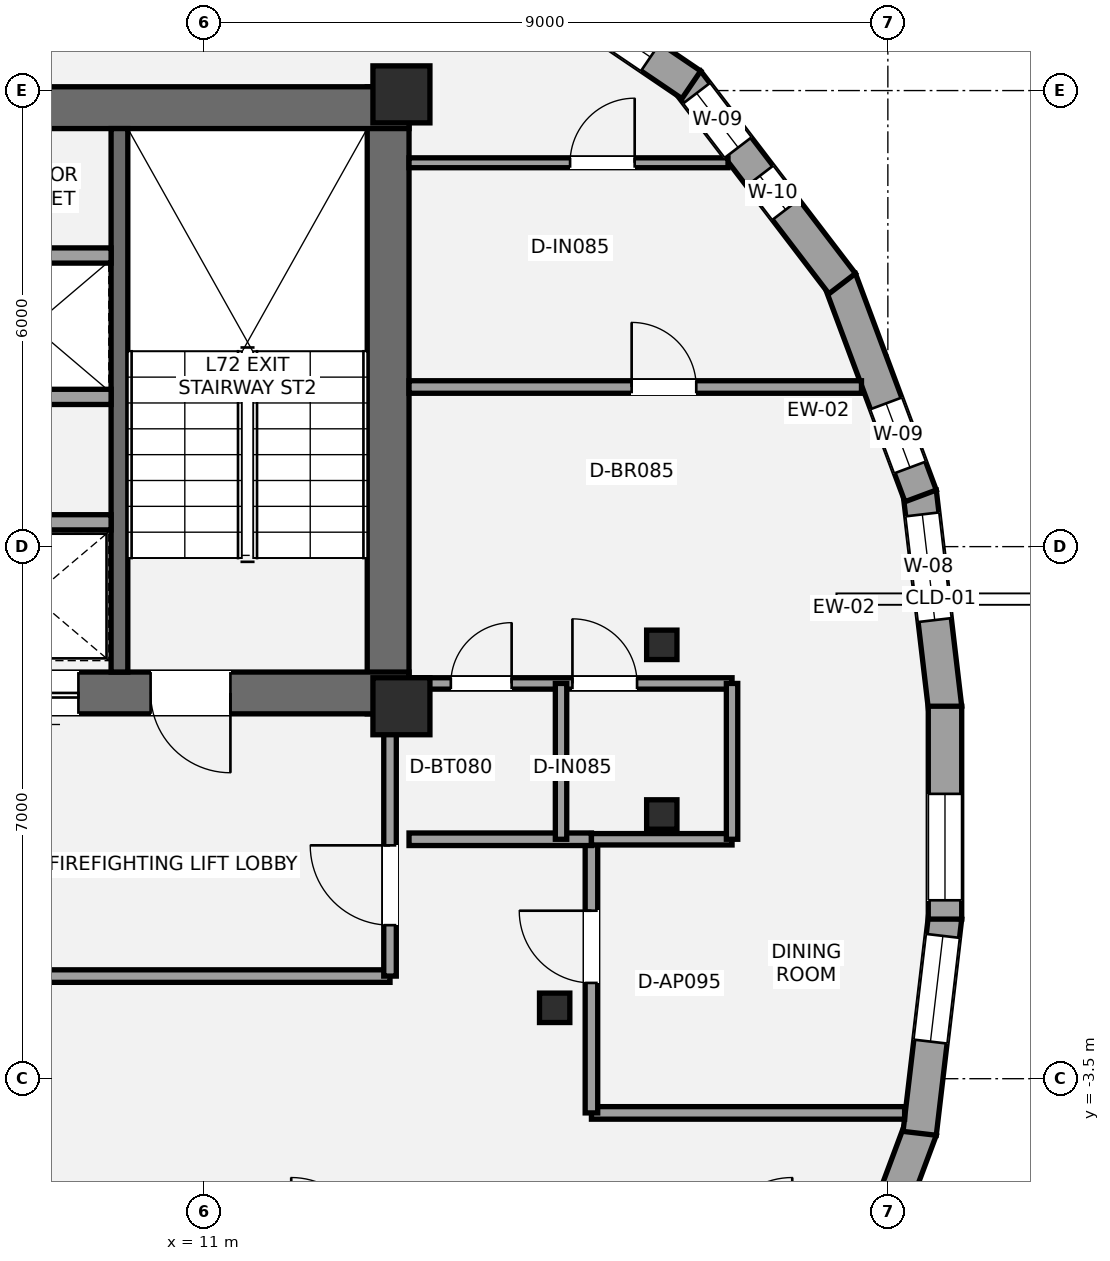
"""IFC4 building model, lengths in metres.
Left out: names, types, materials, properties, quantities, classifications, styles, units other than length and angle.
Written with IfcOpenShell. Run it as: python <this file> out.ifc"""

import sys

from ifc_helpers import new_model, si_unit, direction, frame, frame_2d, origin, origin_2d, place, context, subcontext, project, spatial, rectangle, i_section, extrude, element, fill, save


model = new_model("IFC4")
c1 = context("Model", 3, precision=1e-05, world=origin(), true_north=direction((0.0, 1.0)))
c2 = subcontext(c1, "Body", "Model", "MODEL_VIEW")
j1 = project(units=[si_unit("LENGTHUNIT", "METRE"), si_unit("PLANEANGLEUNIT", "RADIAN")], contexts=[c1])
p1 = place(None, origin())
s1 = spatial("IfcSite", under=j1, at=p1, CompositionType="ELEMENT")
p2 = place(p1, origin())
s2 = spatial("IfcBuilding", under=s1, at=p2, CompositionType="ELEMENT")
p3 = place(p2, frame((0.0, 0.0, 254.1)))
s3 = spatial("IfcBuildingStorey", under=s2, at=p3, CompositionType="ELEMENT", Elevation=254.1)
p4 = place(p3, frame((13.425, 1.3, 0.0), z_axis=(0.0, 0.0, 1.0), x_axis=(0.0, 1.0, 0.0)))
e1 = element("IfcWall", 1, at=p4, inside=s3, PredefinedType="SHEAR", context=c2, shape_type="SweptSolid", body=[
    extrude(rectangle(XDim=8.25, YDim=0.55, at=frame_2d((4.125, 0.0))), origin(), (0.0, 0.0, 1.0), 3.15),
])
p5 = place(p3, frame((4.525, 9.275, 0.0), z_axis=(0.0, 0.0, 1.0), x_axis=(1.0, 0.0, 0.0)))
e2 = element("IfcWall", 2, at=p5, inside=s3, PredefinedType="SHEAR", context=c2, shape_type="SweptSolid", body=[
    extrude(rectangle(XDim=9.175, YDim=0.55, at=frame_2d((4.587, 0.0))), origin(), (0.0, 0.0, 1.0), 3.15),
])
p6 = place(p3, frame((13.7, 1.575, 0.0), z_axis=(0.0, 0.0, 1.0), x_axis=(-1.0, 0.0, 0.0)))
e3 = element("IfcWall", 3, at=p6, inside=s3, PredefinedType="SHEAR", context=c2, shape_type="SweptSolid", body=[
    extrude(rectangle(XDim=8.775, YDim=0.55, at=frame_2d((4.387, 0.0))), origin(), (0.0, 0.0, 1.0), 3.15),
])
p7 = place(p6, frame((2.35, 0.0, 0.0)))
e4 = element("IfcOpeningElement", 4, at=p7, cuts=e3, PredefinedType="OPENING", context=c2, shape_type="SweptSolid", body=[
    extrude(rectangle(XDim=1.05, YDim=2.15, at=frame_2d((0.525, 1.075))), frame((0.0, 0.285, 0.0), z_axis=(0.0, -1.0, 0.0), x_axis=(1.0, 0.0, 0.0)), (0.0, 0.0, 1.0), 0.57),
])
p8 = place(p6, frame((4.35, 0.0, 0.0)))
e5 = element("IfcOpeningElement", 5, at=p8, cuts=e3, PredefinedType="OPENING", context=c2, shape_type="SweptSolid", body=[
    extrude(rectangle(XDim=1.1, YDim=2.2, at=frame_2d((0.55, 1.1))), frame((0.0, 0.285, 0.0), z_axis=(0.0, -1.0, 0.0), x_axis=(1.0, 0.0, 0.0)), (0.0, 0.0, 1.0), 0.57),
])
p9 = place(p3, frame((9.89, 1.85, 0.0), z_axis=(0.0, 0.0, 1.0), x_axis=(0.0, 1.0, 0.0)))
e6 = element("IfcWall", 6, at=p9, inside=s3, PredefinedType="SHEAR", context=c2, shape_type="SweptSolid", body=[
    extrude(rectangle(XDim=7.15, YDim=0.22, at=frame_2d((3.575, 0.0))), origin(), (0.0, 0.0, 1.0), 3.15),
])
for number, where, z_axis, x_axis in (
    (7, (13.6, 1.4, 0.0), (0.0, 0.0, 1.0), (1.0, 0.0, 0.0)),
    (8, (13.6, 9.45, 0.0), (0.0, 0.0, 1.0), (1.0, 0.0, 0.0)),
):
    element("IfcColumn", number, at=place(p3, frame(where, z_axis=z_axis, x_axis=x_axis)), inside=s3, PredefinedType="PILASTER", context=c2, shape_type="SweptSolid", body=[
        extrude(rectangle(XDim=0.75, YDim=0.75, at=origin_2d()), origin(), (0.0, 0.0, 1.0), 3.15),
    ])
for number, where, z_axis, x_axis in (
    (9, (17.026, 2.208, 0.0), (0.0, 0.0, 1.0), (1.0, 0.0, 0.0)),
    (10, (15.616, -2.567, 0.0), (0.0, 0.0, 1.0), (1.0, 0.0, 0.0)),
    (11, (17.026, -0.024, 0.0), (0.0, 0.0, 1.0), (1.0, 0.0, 0.0)),
):
    element("IfcColumn", number, at=place(p3, frame(where, z_axis=z_axis, x_axis=x_axis)), inside=s3, PredefinedType="COLUMN", context=c2, shape_type="SweptSolid", body=[
        extrude(i_section(OverallWidth=0.399, OverallDepth=0.387, WebThickness=0.021, FlangeThickness=0.033, at=origin_2d()), origin(), (0.0, 0.0, 1.0), 3.15),
    ])
p10 = place(p3, frame((20.418, 4.219, 0.0), z_axis=(0.0, 0.0, 1.0), x_axis=(0.116885766715, -0.993145365764, 0.0)))
e12 = element("IfcWall", 12, at=p10, inside=s3, PredefinedType="STANDARD", context=c2, shape_type="SweptSolid", body=[
    extrude(rectangle(XDim=2.864, YDim=0.44, at=frame_2d((1.432, 0.0))), origin(), (0.0, 0.0, 1.0), 2.336),
])
p11 = place(p10, frame((0.297, 0.0, 0.55)))
e13 = element("IfcOpeningElement", 13, at=p11, cuts=e12, PredefinedType="OPENING", context=c2, shape_type="SweptSolid", body=[
    extrude(rectangle(XDim=1.4, YDim=1.55, at=frame_2d((0.7, 0.775))), frame((0.0, 0.23, 0.0), z_axis=(0.0, -1.0, 0.0), x_axis=(1.0, 0.0, 0.0)), (0.0, 0.0, 1.0), 0.46),
])
p12 = place(p3, frame((19.368, 7.017, 0.0), z_axis=(0.0, 0.0, 1.0), x_axis=(0.349627332297, -0.936888856007, 0.0)))
e14 = element("IfcWall", 14, at=p12, inside=s3, PredefinedType="STANDARD", context=c2, shape_type="SweptSolid", body=[
    extrude(rectangle(XDim=3.041, YDim=0.44, at=frame_2d((1.521, 0.0))), origin(), (0.0, 0.0, 1.0), 2.336),
])
p13 = place(p12, frame((1.742, 0.0, 0.58)))
e15 = element("IfcOpeningElement", 15, at=p13, cuts=e14, PredefinedType="OPENING", context=c2, shape_type="SweptSolid", body=[
    extrude(rectangle(XDim=0.9, YDim=1.35, at=frame_2d((0.45, 0.675))), frame((0.0, 0.23, 0.0), z_axis=(0.0, -1.0, 0.0), x_axis=(1.0, 0.0, 0.0)), (0.0, 0.0, 1.0), 0.46),
])
p14 = place(p3, frame((17.362, 9.625, 0.0), z_axis=(0.0, 0.0, 1.0), x_axis=(0.607266352304, -0.794498318034, 0.0)))
e16 = element("IfcWall", 16, at=p14, inside=s3, PredefinedType="STANDARD", context=c2, shape_type="SweptSolid", body=[
    extrude(rectangle(XDim=3.354, YDim=0.44, at=frame_2d((1.677, 0.0))), origin(), (0.0, 0.0, 1.0), 2.336),
])
p15 = place(p14, frame((0.2, 0.0, 0.58)))
e17 = element("IfcOpeningElement", 17, at=p15, cuts=e16, PredefinedType="OPENING", context=c2, shape_type="SweptSolid", body=[
    extrude(rectangle(XDim=0.9, YDim=1.35, at=frame_2d((0.45, 0.675))), frame((0.0, 0.23, 0.0), z_axis=(0.0, -1.0, 0.0), x_axis=(1.0, 0.0, 0.0)), (0.0, 0.0, 1.0), 0.46),
])
p16 = place(p14, frame((1.569, 0.0, 0.58)))
e18 = element("IfcOpeningElement", 18, at=p16, cuts=e16, PredefinedType="OPENING", context=c2, shape_type="SweptSolid", body=[
    extrude(rectangle(XDim=0.56, YDim=1.15, at=frame_2d((0.28, 0.575))), frame((0.0, 0.23, 0.0), z_axis=(0.0, -1.0, 0.0), x_axis=(1.0, 0.0, 0.0)), (0.0, 0.0, 1.0), 0.46),
])
p17 = place(p3, frame((14.269, 11.708, 0.0), z_axis=(0.0, 0.0, 1.0), x_axis=(0.827695346596, -0.561177702001, 0.0)))
e19 = element("IfcWall", 19, at=p17, inside=s3, PredefinedType="STANDARD", context=c2, shape_type="SweptSolid", body=[
    extrude(rectangle(XDim=3.8, YDim=0.44, at=frame_2d((1.9, 0.0))), origin(), (0.0, 0.0, 1.0), 2.336),
])
p18 = place(p17, frame((1.4, 0.0, 0.55)))
e20 = element("IfcOpeningElement", 20, at=p18, cuts=e19, PredefinedType="OPENING", context=c2, shape_type="SweptSolid", body=[
    extrude(rectangle(XDim=1.75, YDim=1.55, at=frame_2d((0.875, 0.775))), frame((0.0, 0.23, 0.0), z_axis=(0.0, -1.0, 0.0), x_axis=(1.0, 0.0, 0.0)), (0.0, 0.0, 1.0), 0.46),
])
p19 = place(p3, frame((20.431, -4.167, 0.0), z_axis=(0.0, 0.0, 1.0), x_axis=(-0.349627332297, -0.936888856007, 0.0)))
e21 = element("IfcWall", 21, at=p19, inside=s3, PredefinedType="STANDARD", context=c2, shape_type="SweptSolid", body=[
    extrude(rectangle(XDim=3.041, YDim=0.44, at=frame_2d((1.521, 0.0))), origin(), (0.0, 0.0, 1.0), 2.336),
])
p20 = place(p3, frame((20.753, -1.375, 0.0), z_axis=(0.0, 0.0, 1.0), x_axis=(-0.116885766715, -0.993145365764, 0.0)))
e22 = element("IfcWall", 22, at=p20, inside=s3, PredefinedType="STANDARD", context=c2, shape_type="SweptSolid", body=[
    extrude(rectangle(XDim=2.864, YDim=0.44, at=frame_2d((1.432, 0.0))), origin(), (0.0, 0.0, 1.0), 2.336),
])
p21 = place(p20, frame((0.248, 0.0, 0.55)))
e23 = element("IfcOpeningElement", 23, at=p21, cuts=e22, PredefinedType="OPENING", context=c2, shape_type="SweptSolid", body=[
    extrude(rectangle(XDim=1.4, YDim=1.55, at=frame_2d((0.7, 0.775))), frame((0.0, 0.23, 0.0), z_axis=(0.0, -1.0, 0.0), x_axis=(1.0, 0.0, 0.0)), (0.0, 0.0, 1.0), 0.46),
])
p22 = place(p3, frame((20.752, 1.4, 0.0), z_axis=(0.0, 0.0, 1.0), x_axis=(0.0, -1.0, 0.0)))
e24 = element("IfcWall", 24, at=p22, inside=s3, PredefinedType="STANDARD", context=c2, shape_type="SweptSolid", body=[
    extrude(rectangle(XDim=2.801, YDim=0.44, at=frame_2d((1.4, 0.0))), origin(), (0.0, 0.0, 1.0), 2.336),
])
p23 = place(p22, frame((1.153, 0.0, 0.58)))
e25 = element("IfcOpeningElement", 25, at=p23, cuts=e24, PredefinedType="OPENING", context=c2, shape_type="SweptSolid", body=[
    extrude(rectangle(XDim=1.4, YDim=1.55, at=frame_2d((0.7, 0.775))), frame((0.0, 0.23, 0.0), z_axis=(0.0, -1.0, 0.0), x_axis=(1.0, 0.0, 0.0)), (0.0, 0.0, 1.0), 0.46),
])
p24 = place(p3, frame((7.2, -2.15, 0.0), z_axis=(0.0, 0.0, 1.0), x_axis=(1.0, 0.0, 0.0)))
e26 = element("IfcWall", 26, at=p24, inside=s3, PredefinedType="PARTITIONING", context=c2, shape_type="SweptSolid", body=[
    extrude(rectangle(XDim=6.25, YDim=0.165, at=frame_2d((3.125, 0.0))), origin(), (0.0, 0.0, 1.0), 2.97),
])
p25 = place(p3, frame((13.45, -2.15, 0.0), z_axis=(0.0, 0.0, 1.0), x_axis=(0.0, 1.0, 0.0)))
e27 = element("IfcWall", 27, at=p25, inside=s3, PredefinedType="PARTITIONING", context=c2, shape_type="SweptSolid", body=[
    extrude(rectangle(XDim=3.5, YDim=0.165, at=frame_2d((1.75, 0.0))), origin(), (0.0, 0.0, 1.0), 2.97),
])
p26 = place(p25, frame((0.67, 0.0, 0.0)))
e28 = element("IfcOpeningElement", 28, at=p26, cuts=e27, PredefinedType="OPENING", context=c2, shape_type="SweptSolid", body=[
    extrude(rectangle(XDim=1.05, YDim=2.15, at=frame_2d((0.525, 1.075))), frame((0.0, 0.093, 0.0), z_axis=(0.0, -1.0, 0.0), x_axis=(1.0, 0.0, 0.0)), (0.0, 0.0, 1.0), 0.185),
])
p27 = place(p3, frame((5.475, 3.82, 0.0), z_axis=(0.0, 0.0, 1.0), x_axis=(1.0, 0.0, 0.0)))
e29 = element("IfcWall", 29, at=p27, inside=s3, PredefinedType="SOLIDWALL", context=c2, shape_type="SweptSolid", body=[
    extrude(rectangle(XDim=4.305, YDim=0.2, at=frame_2d((2.152, 0.0))), origin(), (0.0, 0.0, 1.0), 2.97),
])
p28 = place(p27, frame((0.65, 0.0, 0.0)))
e30 = element("IfcOpeningElement", 30, at=p28, cuts=e29, PredefinedType="OPENING", context=c2, shape_type="SweptSolid", body=[
    extrude(rectangle(XDim=1.2, YDim=2.2, at=frame_2d((0.6, 1.1))), frame((0.0, 0.11, 0.0), z_axis=(0.0, -1.0, 0.0), x_axis=(1.0, 0.0, 0.0)), (0.0, 0.0, 1.0), 0.22),
])
for number, where, z_axis, x_axis in (
    (31, (5.475, 5.47, 0.0), (0.0, 0.0, 1.0), (1.0, 0.0, 0.0)),
    (32, (5.475, 7.33, 0.0), (0.0, 0.0, 1.0), (1.0, 0.0, 0.0)),
):
    element("IfcWall", number, at=place(p3, frame(where, z_axis=z_axis, x_axis=x_axis)), inside=s3, PredefinedType="SOLIDWALL", context=c2, shape_type="SweptSolid", body=[
        extrude(rectangle(XDim=4.305, YDim=0.2, at=frame_2d((2.152, 0.0))), origin(), (0.0, 0.0, 1.0), 2.97),
    ])
p29 = place(p3, frame((16.1, -3.95, 0.0), z_axis=(0.0, 0.0, 1.0), x_axis=(1.0, 0.0, 0.0)))
e33 = element("IfcWall", 33, at=p29, inside=s3, PredefinedType="PARTITIONING", context=c2, shape_type="SweptSolid", body=[
    extrude(rectangle(XDim=4.12, YDim=0.165, at=frame_2d((2.06, 0.0))), origin(), (0.0, 0.0, 1.0), 2.423),
])
p30 = place(p3, frame((16.1, -3.95, 0.0), z_axis=(0.0, 0.0, 1.0), x_axis=(0.0, 1.0, 0.0)))
e34 = element("IfcWall", 34, at=p30, inside=s3, PredefinedType="PARTITIONING", context=c2, shape_type="SweptSolid", body=[
    extrude(rectangle(XDim=3.6, YDim=0.165, at=frame_2d((1.8, 0.0))), origin(), (0.0, 0.0, 1.0), 2.357),
])
p31 = place(p30, frame((1.71, 0.0, 0.0)))
e35 = element("IfcOpeningElement", 35, at=p31, cuts=e34, PredefinedType="OPENING", context=c2, shape_type="SweptSolid", body=[
    extrude(rectangle(XDim=0.95, YDim=2.15, at=frame_2d((0.475, 1.075))), frame((0.0, 0.093, 0.0), z_axis=(0.0, -1.0, 0.0), x_axis=(1.0, 0.0, 0.0)), (0.0, 0.0, 1.0), 0.185),
])
p32 = place(p3, frame((13.7, -0.35, 0.0), z_axis=(0.0, 0.0, 1.0), x_axis=(1.0, 0.0, 0.0)))
e36 = element("IfcWall", 36, at=p32, inside=s3, PredefinedType="PARTITIONING", context=c2, shape_type="SweptSolid", body=[
    extrude(rectangle(XDim=2.4, YDim=0.165, at=frame_2d((1.2, 0.0))), origin(), (0.0, 0.0, 1.0), 2.423),
])
p33 = place(p3, frame((13.7, 5.6, 0.0), z_axis=(0.0, 0.0, 1.0), x_axis=(1.0, 0.0, 0.0)))
e37 = element("IfcWall", 37, at=p33, inside=s3, PredefinedType="PARTITIONING", context=c2, shape_type="SweptSolid", body=[
    extrude(rectangle(XDim=5.953, YDim=0.165, at=frame_2d((2.977, 0.0))), origin(), (0.0, 0.0, 1.0), 2.423),
])
p34 = place(p33, frame((2.929, 0.0, 0.0)))
e38 = element("IfcOpeningElement", 38, at=p34, cuts=e37, PredefinedType="OPENING", context=c2, shape_type="SweptSolid", body=[
    extrude(rectangle(XDim=0.85, YDim=2.1, at=frame_2d((0.425, 1.05))), frame((0.0, 0.093, 0.0), z_axis=(0.0, -1.0, 0.0), x_axis=(1.0, 0.0, 0.0)), (0.0, 0.0, 1.0), 0.185),
])
p35 = place(p3, frame((13.7, 1.7, 0.0), z_axis=(0.0, 0.0, 1.0), x_axis=(1.0, 0.0, 0.0)))
e39 = element("IfcWall", 39, at=p35, inside=s3, PredefinedType="PLUMBINGWALL", context=c2, shape_type="SweptSolid", body=[
    extrude(rectangle(XDim=4.25, YDim=0.15, at=frame_2d((2.125, 0.0))), origin(), (0.0, 0.0, 1.0), 2.423),
])
p36 = place(p35, frame((0.55, 0.0, 0.0)))
e40 = element("IfcOpeningElement", 40, at=p36, cuts=e39, PredefinedType="OPENING", context=c2, shape_type="SweptSolid", body=[
    extrude(rectangle(XDim=0.8, YDim=2.1, at=frame_2d((0.4, 1.05))), frame((0.0, 0.085, 0.0), z_axis=(0.0, -1.0, 0.0), x_axis=(1.0, 0.0, 0.0)), (0.0, 0.0, 1.0), 0.17),
])
p37 = place(p35, frame((2.15, 0.0, 0.0)))
e41 = element("IfcOpeningElement", 41, at=p37, cuts=e39, PredefinedType="OPENING", context=c2, shape_type="SweptSolid", body=[
    extrude(rectangle(XDim=0.85, YDim=2.1, at=frame_2d((0.425, 1.05))), frame((0.0, 0.085, 0.0), z_axis=(0.0, -1.0, 0.0), x_axis=(1.0, 0.0, 0.0)), (0.0, 0.0, 1.0), 0.17),
])
p38 = place(p3, frame((16.1, -0.35, 0.0), z_axis=(0.0, 0.0, 1.0), x_axis=(1.0, 0.0, 0.0)))
e42 = element("IfcWall", 42, at=p38, inside=s3, PredefinedType="PLUMBINGWALL", context=c2, shape_type="SweptSolid", body=[
    extrude(rectangle(XDim=1.85, YDim=0.15, at=frame_2d((0.925, 0.0))), origin(), (0.0, 0.0, 1.0), 2.423),
])
p39 = place(p3, frame((15.7, -0.35, 0.0), z_axis=(0.0, 0.0, 1.0), x_axis=(0.0, 1.0, 0.0)))
e43 = element("IfcWall", 43, at=p39, inside=s3, PredefinedType="PLUMBINGWALL", context=c2, shape_type="SweptSolid", body=[
    extrude(rectangle(XDim=2.05, YDim=0.15, at=frame_2d((1.025, 0.0))), origin(), (0.0, 0.0, 1.0), 2.423),
])
p40 = place(p3, frame((17.95, -0.35, 0.0), z_axis=(0.0, 0.0, 1.0), x_axis=(0.0, 1.0, 0.0)))
e44 = element("IfcWall", 44, at=p40, inside=s3, PredefinedType="PLUMBINGWALL", context=c2, shape_type="SweptSolid", body=[
    extrude(rectangle(XDim=2.05, YDim=0.15, at=frame_2d((1.025, 0.0))), origin(), (0.0, 0.0, 1.0), 2.97),
])
p41 = place(p3, frame((13.7, 8.55, 0.0), z_axis=(0.0, 0.0, 1.0), x_axis=(1.0, 0.0, 0.0)))
e45 = element("IfcWall", 45, at=p41, inside=s3, PredefinedType="PARTITIONING", context=c2, shape_type="SweptSolid", body=[
    extrude(rectangle(XDim=4.197, YDim=0.13, at=frame_2d((2.098, 0.0))), origin(), (0.0, 0.0, 1.0), 2.423),
])
p42 = place(p41, frame((2.119, 0.0, 0.0)))
e46 = element("IfcOpeningElement", 46, at=p42, cuts=e45, PredefinedType="OPENING", context=c2, shape_type="SweptSolid", body=[
    extrude(rectangle(XDim=0.85, YDim=2.1, at=frame_2d((0.425, 1.05))), frame((0.0, 0.075, 0.0), z_axis=(0.0, -1.0, 0.0), x_axis=(1.0, 0.0, 0.0)), (0.0, 0.0, 1.0), 0.15),
])
p43 = place(p11, origin())
e47 = element("IfcWindow", 47, at=p43, inside=s3, PartitioningType="SINGLE_PANEL", PredefinedType="WINDOW", context=c2, shape_type="SweptSolid", body=[
    extrude(rectangle(XDim=1.4, YDim=1.55, at=frame_2d((0.7, 0.775))), frame((0.0, -0.01, 0.0), z_axis=(0.0, -1.0, 0.0), x_axis=(1.0, 0.0, 0.0)), (0.0, 0.0, 1.0), 0.06),
])
fill(e13, e47)
p44 = place(p13, origin())
e48 = element("IfcWindow", 48, at=p44, inside=s3, PartitioningType="SINGLE_PANEL", PredefinedType="WINDOW", context=c2, shape_type="SweptSolid", body=[
    extrude(rectangle(XDim=0.9, YDim=1.35, at=frame_2d((0.45, 0.675))), frame((0.0, -0.01, 0.0), z_axis=(0.0, -1.0, 0.0), x_axis=(1.0, 0.0, 0.0)), (0.0, 0.0, 1.0), 0.06),
])
fill(e15, e48)
p45 = place(p15, origin())
e49 = element("IfcWindow", 49, at=p45, inside=s3, PartitioningType="SINGLE_PANEL", PredefinedType="WINDOW", context=c2, shape_type="SweptSolid", body=[
    extrude(rectangle(XDim=0.9, YDim=1.35, at=frame_2d((0.45, 0.675))), frame((0.0, -0.01, 0.0), z_axis=(0.0, -1.0, 0.0), x_axis=(1.0, 0.0, 0.0)), (0.0, 0.0, 1.0), 0.06),
])
fill(e17, e49)
p46 = place(p18, origin())
e50 = element("IfcWindow", 50, at=p46, inside=s3, PartitioningType="SINGLE_PANEL", PredefinedType="WINDOW", context=c2, shape_type="SweptSolid", body=[
    extrude(rectangle(XDim=1.75, YDim=1.55, at=frame_2d((0.875, 0.775))), frame((0.0, -0.01, 0.0), z_axis=(0.0, -1.0, 0.0), x_axis=(1.0, 0.0, 0.0)), (0.0, 0.0, 1.0), 0.06),
])
fill(e20, e50)
p47 = place(p21, origin())
e51 = element("IfcWindow", 51, at=p47, inside=s3, PartitioningType="SINGLE_PANEL", PredefinedType="WINDOW", context=c2, shape_type="SweptSolid", body=[
    extrude(rectangle(XDim=1.4, YDim=1.55, at=frame_2d((0.7, 0.775))), frame((0.0, -0.01, 0.0), z_axis=(0.0, -1.0, 0.0), x_axis=(1.0, 0.0, 0.0)), (0.0, 0.0, 1.0), 0.06),
])
fill(e23, e51)
p48 = place(p23, origin())
e52 = element("IfcWindow", 52, at=p48, inside=s3, PartitioningType="SINGLE_PANEL", PredefinedType="WINDOW", context=c2, shape_type="SweptSolid", body=[
    extrude(rectangle(XDim=1.4, YDim=1.55, at=frame_2d((0.7, 0.775))), frame((0.0, -0.01, 0.0), z_axis=(0.0, -1.0, 0.0), x_axis=(1.0, 0.0, 0.0)), (0.0, 0.0, 1.0), 0.06),
])
fill(e25, e52)
p49 = place(p16, origin())
e53 = element("IfcWindow", 53, at=p49, inside=s3, PartitioningType="SINGLE_PANEL", PredefinedType="WINDOW", context=c2, shape_type="SweptSolid", body=[
    extrude(rectangle(XDim=0.56, YDim=1.15, at=frame_2d((0.28, 0.575))), frame((0.0, -0.01, 0.0), z_axis=(0.0, -1.0, 0.0), x_axis=(1.0, 0.0, 0.0)), (0.0, 0.0, 1.0), 0.06),
])
fill(e18, e53)
p50 = place(p7, origin())
e54 = element("IfcDoor", 54, at=p50, inside=s3, OperationType="SINGLE_SWING_LEFT", PredefinedType="DOOR", context=c2, shape_type="SweptSolid", body=[
    extrude(rectangle(XDim=1.05, YDim=2.15, at=frame_2d((0.525, 1.075))), frame((0.0, 0.025, 0.0), z_axis=(0.0, -1.0, 0.0), x_axis=(1.0, 0.0, 0.0)), (0.0, 0.0, 1.0), 0.05),
])
fill(e4, e54)
p51 = place(p26, origin())
e55 = element("IfcDoor", 55, at=p51, inside=s3, OperationType="SINGLE_SWING_RIGHT", PredefinedType="DOOR", context=c2, shape_type="SweptSolid", body=[
    extrude(rectangle(XDim=1.05, YDim=2.15, at=frame_2d((0.525, 1.075))), frame((0.0, 0.025, 0.0), z_axis=(0.0, -1.0, 0.0), x_axis=(1.0, 0.0, 0.0)), (0.0, 0.0, 1.0), 0.05),
])
fill(e28, e55)
p52 = place(p8, origin())
e56 = element("IfcDoor", 56, at=p52, inside=s3, OperationType="SLIDING_TO_LEFT", PredefinedType="DOOR", context=c2, shape_type="SweptSolid", body=[
    extrude(rectangle(XDim=1.1, YDim=2.2, at=frame_2d((0.55, 1.1))), frame((0.0, 0.025, 0.0), z_axis=(0.0, -1.0, 0.0), x_axis=(1.0, 0.0, 0.0)), (0.0, 0.0, 1.0), 0.05),
])
fill(e5, e56)
p53 = place(p31, origin())
e57 = element("IfcDoor", 57, at=p53, inside=s3, OperationType="SINGLE_SWING_RIGHT", PredefinedType="DOOR", context=c2, shape_type="SweptSolid", body=[
    extrude(rectangle(XDim=0.95, YDim=2.15, at=frame_2d((0.475, 1.075))), frame((0.0, 0.025, 0.0), z_axis=(0.0, -1.0, 0.0), x_axis=(1.0, 0.0, 0.0)), (0.0, 0.0, 1.0), 0.05),
])
fill(e35, e57)
p54 = place(p36, origin())
e58 = element("IfcDoor", 58, at=p54, inside=s3, OperationType="SINGLE_SWING_RIGHT", PredefinedType="DOOR", context=c2, shape_type="SweptSolid", body=[
    extrude(rectangle(XDim=0.8, YDim=2.1, at=frame_2d((0.4, 1.05))), frame((0.0, 0.025, 0.0), z_axis=(0.0, -1.0, 0.0), x_axis=(1.0, 0.0, 0.0)), (0.0, 0.0, 1.0), 0.05),
])
fill(e40, e58)
p55 = place(p37, origin())
e59 = element("IfcDoor", 59, at=p55, inside=s3, OperationType="SINGLE_SWING_LEFT", PredefinedType="DOOR", context=c2, shape_type="SweptSolid", body=[
    extrude(rectangle(XDim=0.85, YDim=2.1, at=frame_2d((0.425, 1.05))), frame((0.0, 0.025, 0.0), z_axis=(0.0, -1.0, 0.0), x_axis=(1.0, 0.0, 0.0)), (0.0, 0.0, 1.0), 0.05),
])
fill(e41, e59)
p56 = place(p34, origin())
e60 = element("IfcDoor", 60, at=p56, inside=s3, OperationType="SINGLE_SWING_LEFT", PredefinedType="DOOR", context=c2, shape_type="SweptSolid", body=[
    extrude(rectangle(XDim=0.85, YDim=2.1, at=frame_2d((0.425, 1.05))), frame((0.0, 0.025, 0.0), z_axis=(0.0, -1.0, 0.0), x_axis=(1.0, 0.0, 0.0)), (0.0, 0.0, 1.0), 0.05),
])
fill(e38, e60)
p57 = place(p42, origin())
e61 = element("IfcDoor", 61, at=p57, inside=s3, OperationType="SINGLE_SWING_RIGHT", PredefinedType="DOOR", context=c2, shape_type="SweptSolid", body=[
    extrude(rectangle(XDim=0.85, YDim=2.1, at=frame_2d((0.425, 1.05))), frame((0.0, 0.025, 0.0), z_axis=(0.0, -1.0, 0.0), x_axis=(1.0, 0.0, 0.0)), (0.0, 0.0, 1.0), 0.05),
])
fill(e46, e61)
save(model, sys.argv[1])
